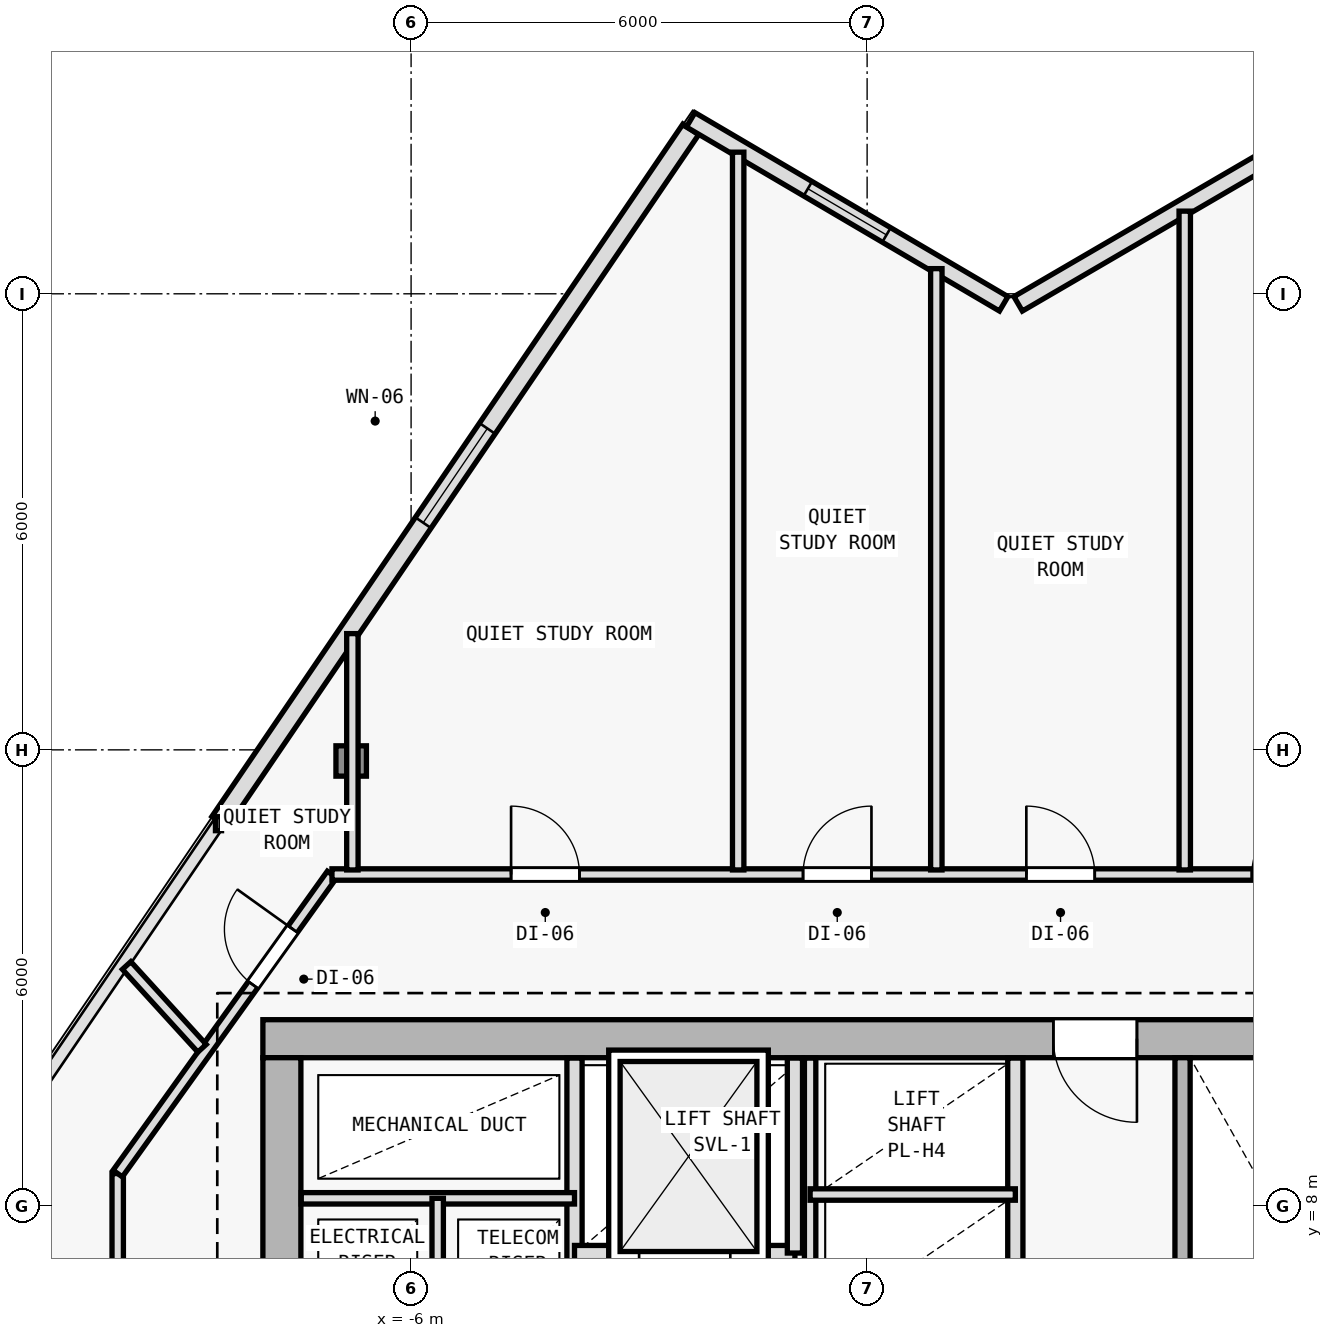
"""IFC4 building model, lengths in metres.
Left out: names, types, materials, properties, quantities, classifications, styles, units other than length and angle.
Written with IfcOpenShell. Run it as: python <this file> out.ifc"""

import sys

from ifc_helpers import new_model, si_unit, direction, frame, frame_2d, origin, origin_2d, place, context, subcontext, project, spatial, rectangle, i_section, extrude, element, fill, save


model = new_model("IFC4")
c1 = context("Model", 3, precision=1e-05, world=origin(), true_north=direction((0.0, 1.0)))
c2 = subcontext(c1, "Body", "Model", "MODEL_VIEW")
j1 = project(units=[si_unit("LENGTHUNIT", "METRE"), si_unit("PLANEANGLEUNIT", "RADIAN")], contexts=[c1])
p1 = place(None, origin())
s1 = spatial("IfcSite", under=j1, at=p1, CompositionType="ELEMENT")
p2 = place(p1, origin())
s2 = spatial("IfcBuilding", under=s1, at=p2, CompositionType="ELEMENT")
p3 = place(p2, frame((0.0, 0.0, 167.4)))
s3 = spatial("IfcBuildingStorey", under=s2, at=p3, CompositionType="ELEMENT", Elevation=167.4)
p4 = place(p3, frame((-7.7, 10.2, 0.0), z_axis=(0.0, 0.0, 1.0), x_axis=(1.0, 0.0, 0.0)))
e1 = element("IfcColumn", 1, at=p4, inside=s3, PredefinedType="COLUMN", context=c2, shape_type="SweptSolid", body=[
    extrude(i_section(OverallWidth=0.404, OverallDepth=0.407, WebThickness=0.017, FlangeThickness=0.028, FilletRadius=0.015, at=origin_2d()), origin(), (0.0, 0.0, 1.0), 3.6),
])
p5 = place(p3, frame((-6.788, 13.854, 0.006), z_axis=(0.008775143007, -0.002584925847, 0.999958156636), x_axis=(0.282568886397, 0.959247009086, 0.0)))
e2 = element("IfcColumn", 2, at=p5, inside=s3, PredefinedType="COLUMN", context=c2, shape_type="SweptSolid", body=[
    extrude(i_section(OverallWidth=0.401, OverallDepth=0.399, WebThickness=0.016, FlangeThickness=0.025, FilletRadius=0.015, at=origin_2d()), origin(), (0.0, 0.0, 1.0), 3.589),
])
p6 = place(p3, frame((-8.517, 13.053, 0.0), z_axis=(0.0, 0.0, 1.0), x_axis=(0.562463961516, 0.826821801838, 0.0)))
e3 = element("IfcWall", 3, at=p6, inside=s3, PredefinedType="SOLIDWALL", context=c2, shape_type="SweptSolid", body=[
    extrude(rectangle(XDim=11.018, YDim=0.25, at=frame_2d((5.509, 0.0))), origin(), (0.0, 0.0, 1.0), 3.35),
])
p7 = place(p6, frame((4.759, 0.0, 0.62)))
e4 = element("IfcOpeningElement", 4, at=p7, cuts=e3, PredefinedType="OPENING", context=c2, shape_type="SweptSolid", body=[
    extrude(rectangle(XDim=1.5, YDim=2.0, at=frame_2d((0.75, 1.0))), frame((0.0, 0.135, 0.0), z_axis=(0.0, -1.0, 0.0), x_axis=(1.0, 0.0, 0.0)), (0.0, 0.0, 1.0), 0.27),
])
p8 = place(p3, frame((1.987, 19.868, 0.0), z_axis=(0.0, 0.0, 1.0), x_axis=(0.863979520686, 0.503526948469, 0.0)))
e5 = element("IfcWall", 5, at=p8, inside=s3, PredefinedType="SOLIDWALL", context=c2, shape_type="SweptSolid", body=[
    extrude(rectangle(XDim=4.324, YDim=0.22, at=frame_2d((2.162, 0.0))), origin(), (0.0, 0.0, 1.0), 3.35),
])
p9 = place(p3, frame((-2.322, 22.289, 0.0), z_axis=(0.0, 0.0, 1.0), x_axis=(0.862111523483, -0.506718581738, 0.0)))
e6 = element("IfcWall", 6, at=p9, inside=s3, PredefinedType="SOLIDWALL", context=c2, shape_type="SweptSolid", body=[
    extrude(rectangle(XDim=4.777, YDim=0.22, at=frame_2d((2.389, 0.0))), origin(), (0.0, 0.0, 1.0), 3.35),
])
p10 = place(p9, frame((1.789, 0.0, 0.62)))
e7 = element("IfcOpeningElement", 7, at=p10, cuts=e6, PredefinedType="OPENING", context=c2, shape_type="SweptSolid", body=[
    extrude(rectangle(XDim=1.2, YDim=1.8, at=frame_2d((0.6, 0.9))), frame((0.0, 0.12, 0.0), z_axis=(0.0, -1.0, 0.0), x_axis=(1.0, 0.0, 0.0)), (0.0, 0.0, 1.0), 0.24),
])
p11 = place(p3, frame((7.95, 10.2, 0.0), z_axis=(0.0, 0.0, 1.0), x_axis=(-1.0, 0.0, 0.0)))
e8 = element("IfcWall", 8, at=p11, inside=s3, PredefinedType="SHEAR", context=c2, shape_type="SweptSolid", body=[
    extrude(rectangle(XDim=15.9, YDim=0.5, at=frame_2d((7.95, 0.0))), origin(), (0.0, 0.0, 1.0), 3.35),
])
p12 = place(p11, frame((4.4, 0.0, 0.0)))
e9 = element("IfcOpeningElement", 9, at=p12, cuts=e8, PredefinedType="OPENING", context=c2, shape_type="SweptSolid", body=[
    extrude(rectangle(XDim=1.1, YDim=2.15, at=frame_2d((0.55, 1.075))), frame((0.0, 0.26, 0.0), z_axis=(0.0, -1.0, 0.0), x_axis=(1.0, 0.0, 0.0)), (0.0, 0.0, 1.0), 0.52),
])
p13 = place(p3, frame((-7.7, -9.15, 0.0), z_axis=(0.0, 0.0, 1.0), x_axis=(0.0, 1.0, 0.0)))
e10 = element("IfcWall", 10, at=p13, inside=s3, PredefinedType="SHEAR", context=c2, shape_type="SweptSolid", body=[
    extrude(rectangle(XDim=19.1, YDim=0.5, at=frame_2d((9.55, 0.0))), origin(), (0.0, 0.0, 1.0), 3.35),
])
p14 = place(p13, frame((12.7, 0.0, 0.0)))
e11 = element("IfcOpeningElement", 11, at=p14, cuts=e10, PredefinedType="OPENING", context=c2, shape_type="SweptSolid", body=[
    extrude(rectangle(XDim=1.1, YDim=2.15, at=frame_2d((0.55, 1.075))), frame((0.0, 0.26, 0.0), z_axis=(0.0, -1.0, 0.0), x_axis=(1.0, 0.0, 0.0)), (0.0, 0.0, 1.0), 0.52),
])
p15 = place(p3, frame((-3.85, 1.35, 0.0), z_axis=(0.0, 0.0, 1.0), x_axis=(0.0, 1.0, 0.0)))
e12 = element("IfcWall", 12, at=p15, inside=s3, PredefinedType="SOLIDWALL", context=c2, shape_type="SweptSolid", body=[
    extrude(rectangle(XDim=8.595, YDim=0.2, at=frame_2d((4.297, 0.0))), origin(), (0.0, 0.0, 1.0), 3.35),
])
p16 = place(p15, frame((1.5, 0.0, 0.0)))
e13 = element("IfcOpeningElement", 13, at=p16, cuts=e12, PredefinedType="OPENING", context=c2, shape_type="SweptSolid", body=[
    extrude(rectangle(XDim=1.0, YDim=2.15, at=frame_2d((0.5, 1.075))), frame((0.0, 0.11, 0.0), z_axis=(0.0, -1.0, 0.0), x_axis=(1.0, 0.0, 0.0)), (0.0, 0.0, 1.0), 0.22),
])
p17 = place(p15, frame((3.18, 0.0, 0.0)))
e14 = element("IfcOpeningElement", 14, at=p17, cuts=e12, PredefinedType="OPENING", context=c2, shape_type="SweptSolid", body=[
    extrude(rectangle(XDim=1.0, YDim=2.15, at=frame_2d((0.5, 1.075))), frame((0.0, 0.11, 0.0), z_axis=(0.0, -1.0, 0.0), x_axis=(1.0, 0.0, 0.0)), (0.0, 0.0, 1.0), 0.22),
])
p18 = place(p3, frame((-7.445, 8.1, 0.0), z_axis=(0.0, 0.0, 1.0), x_axis=(1.0, 0.0, 0.0)))
e15 = element("IfcWall", 15, at=p18, inside=s3, PredefinedType="PARTITIONING", context=c2, shape_type="SweptSolid", body=[
    extrude(rectangle(XDim=3.595, YDim=0.15, at=frame_2d((1.797, 0.0))), origin(), (0.0, 0.0, 1.0), 3.35),
])
p19 = place(p3, frame((-5.65, 6.05, 0.0), z_axis=(0.0, 0.0, 1.0), x_axis=(0.0, 1.0, 0.0)))
e16 = element("IfcWall", 16, at=p19, inside=s3, PredefinedType="PARTITIONING", context=c2, shape_type="SweptSolid", body=[
    extrude(rectangle(XDim=2.05, YDim=0.15, at=frame_2d((1.025, 0.0))), origin(), (0.0, 0.0, 1.0), 3.35),
])
p20 = place(p3, frame((4.15, 2.75, 0.0), z_axis=(0.0, 0.0, 1.0), x_axis=(0.0, 1.0, 0.0)))
e17 = element("IfcWall", 17, at=p20, inside=s3, PredefinedType="SOLIDWALL", context=c2, shape_type="SweptSolid", body=[
    extrude(rectangle(XDim=7.2, YDim=0.2, at=frame_2d((3.6, 0.0))), origin(), (0.0, 0.0, 1.0), 3.35),
])
p21 = place(p20, frame((0.35, 0.0, 0.0)))
e18 = element("IfcOpeningElement", 18, at=p21, cuts=e17, PredefinedType="OPENING", context=c2, shape_type="SweptSolid", body=[
    extrude(rectangle(XDim=1.0, YDim=2.15, at=frame_2d((0.5, 1.075))), frame((0.0, 0.11, 0.0), z_axis=(0.0, -1.0, 0.0), x_axis=(1.0, 0.0, 0.0)), (0.0, 0.0, 1.0), 0.22),
])
p22 = place(p3, frame((-3.85, 7.38, 0.0), z_axis=(0.0, 0.0, 1.0), x_axis=(1.0, 0.0, 0.0)))
e19 = element("IfcWall", 19, at=p22, inside=s3, PredefinedType="SOLIDWALL", context=c2, shape_type="SweptSolid", body=[
    extrude(rectangle(XDim=2.9, YDim=0.2, at=frame_2d((1.45, 0.0))), origin(), (0.0, 0.0, 1.0), 3.35),
])
p23 = place(p22, frame((0.85, 0.0, 0.0)))
e20 = element("IfcOpeningElement", 20, at=p23, cuts=e19, PredefinedType="OPENING", context=c2, shape_type="SweptSolid", body=[
    extrude(rectangle(XDim=1.2, YDim=2.2, at=frame_2d((0.6, 1.1))), frame((0.0, 0.11, 0.0), z_axis=(0.0, -1.0, 0.0), x_axis=(1.0, 0.0, 0.0)), (0.0, 0.0, 1.0), 0.22),
])
p24 = place(p3, frame((-0.95, 7.38, 0.0), z_axis=(0.0, 0.0, 1.0), x_axis=(0.0, 1.0, 0.0)))
e21 = element("IfcWall", 21, at=p24, inside=s3, PredefinedType="SOLIDWALL", context=c2, shape_type="SweptSolid", body=[
    extrude(rectangle(XDim=2.565, YDim=0.2, at=frame_2d((1.283, 0.0))), origin(), (0.0, 0.0, 1.0), 3.35),
])
p25 = place(p3, frame((1.95, 2.65, 0.0), z_axis=(0.0, 0.0, 1.0), x_axis=(0.0, 1.0, 0.0)))
e22 = element("IfcWall", 22, at=p25, inside=s3, PredefinedType="SOLIDWALL", context=c2, shape_type="SweptSolid", body=[
    extrude(rectangle(XDim=7.295, YDim=0.2, at=frame_2d((3.647, 0.0))), origin(), (0.0, 0.0, 1.0), 3.35),
])
p26 = place(p3, frame((-0.75, 5.92, 0.0), z_axis=(0.0, 0.0, 1.0), x_axis=(0.0, 1.0, 0.0)))
e23 = element("IfcWall", 23, at=p26, inside=s3, PredefinedType="PARTITIONING", context=c2, shape_type="SweptSolid", body=[
    extrude(rectangle(XDim=4.025, YDim=0.15, at=frame_2d((2.013, 0.0))), origin(), (0.0, 0.0, 1.0), 3.35),
])
p27 = place(p3, frame((-0.75, 8.15, 0.0), z_axis=(0.0, 0.0, 1.0), x_axis=(1.0, 0.0, 0.0)))
e24 = element("IfcWall", 24, at=p27, inside=s3, PredefinedType="PARTITIONING", context=c2, shape_type="SweptSolid", body=[
    extrude(rectangle(XDim=2.7, YDim=0.15, at=frame_2d((1.35, 0.0))), origin(), (0.0, 0.0, 1.0), 3.35),
])
p28 = place(p3, frame((-9.86, -11.56, 0.0), z_axis=(0.0, 0.0, 1.0), x_axis=(0.0, 1.0, 0.0)))
e25 = element("IfcWall", 25, at=p28, inside=s3, PredefinedType="PARTITIONING", context=c2, shape_type="SweptSolid", body=[
    extrude(rectangle(XDim=19.986, YDim=0.15, at=frame_2d((9.993, 0.0))), origin(), (0.0, 0.0, 1.0), 2.775),
])
p29 = place(p28, frame((8.395, 0.0, 0.0)))
e26 = element("IfcOpeningElement", 26, at=p29, cuts=e25, PredefinedType="OPENING", context=c2, shape_type="SweptSolid", body=[
    extrude(rectangle(XDim=0.9, YDim=2.1, at=frame_2d((0.45, 1.05))), frame((0.0, 0.085, 0.0), z_axis=(0.0, -1.0, 0.0), x_axis=(1.0, 0.0, 0.0)), (0.0, 0.0, 1.0), 0.17),
])
p30 = place(p28, frame((5.685, 0.0, 0.0)))
e27 = element("IfcOpeningElement", 27, at=p30, cuts=e25, PredefinedType="OPENING", context=c2, shape_type="SweptSolid", body=[
    extrude(rectangle(XDim=0.9, YDim=2.1, at=frame_2d((0.45, 1.05))), frame((0.0, 0.085, 0.0), z_axis=(0.0, -1.0, 0.0), x_axis=(1.0, 0.0, 0.0)), (0.0, 0.0, 1.0), 0.17),
])
p31 = place(p28, frame((1.97, 0.0, 0.0)))
e28 = element("IfcOpeningElement", 28, at=p31, cuts=e25, PredefinedType="OPENING", context=c2, shape_type="SweptSolid", body=[
    extrude(rectangle(XDim=0.9, YDim=2.1, at=frame_2d((0.45, 1.05))), frame((0.0, 0.085, 0.0), z_axis=(0.0, -1.0, 0.0), x_axis=(1.0, 0.0, 0.0)), (0.0, 0.0, 1.0), 0.17),
])
p32 = place(p28, frame((16.972, 0.0, 0.0)))
e29 = element("IfcOpeningElement", 29, at=p32, cuts=e25, PredefinedType="OPENING", context=c2, shape_type="SweptSolid", body=[
    extrude(rectangle(XDim=0.9, YDim=2.1, at=frame_2d((0.45, 1.05))), frame((0.0, 0.085, 0.0), z_axis=(0.0, -1.0, 0.0), x_axis=(1.0, 0.0, 0.0)), (0.0, 0.0, 1.0), 0.17),
])
p33 = place(p28, frame((12.11, 0.0, 0.0)))
e30 = element("IfcOpeningElement", 30, at=p33, cuts=e25, PredefinedType="OPENING", context=c2, shape_type="SweptSolid", body=[
    extrude(rectangle(XDim=0.9, YDim=2.1, at=frame_2d((0.45, 1.05))), frame((0.0, 0.085, 0.0), z_axis=(0.0, -1.0, 0.0), x_axis=(1.0, 0.0, 0.0)), (0.0, 0.0, 1.0), 0.17),
])
p34 = place(p3, frame((-9.86, 8.426, 0.0), z_axis=(0.0, 0.0, 1.0), x_axis=(0.582449511476, 0.812866881218, 0.0)))
e31 = element("IfcWall", 31, at=p34, inside=s3, PredefinedType="PARTITIONING", context=c2, shape_type="SweptSolid", body=[
    extrude(rectangle(XDim=4.84, YDim=0.15, at=frame_2d((2.42, 0.0))), origin(), (0.0, 0.0, 1.0), 2.965),
])
p35 = place(p34, frame((3.055, 0.0, 0.0)))
e32 = element("IfcOpeningElement", 32, at=p35, cuts=e31, PredefinedType="OPENING", context=c2, shape_type="SweptSolid", body=[
    extrude(rectangle(XDim=0.9, YDim=2.1, at=frame_2d((0.45, 1.05))), frame((0.0, 0.085, 0.0), z_axis=(0.0, -1.0, 0.0), x_axis=(1.0, 0.0, 0.0)), (0.0, 0.0, 1.0), 0.17),
])
p36 = place(p3, frame((-7.041, 12.36, 0.0), z_axis=(0.0, 0.0, 1.0), x_axis=(1.0, 0.0, 0.0)))
e33 = element("IfcWall", 33, at=p36, inside=s3, PredefinedType="PARTITIONING", context=c2, shape_type="SweptSolid", body=[
    extrude(rectangle(XDim=14.064, YDim=0.15, at=frame_2d((7.032, 0.0))), origin(), (0.0, 0.0, 1.0), 2.965),
])
p37 = place(p36, frame((12.103, 0.0, 0.0)))
e34 = element("IfcOpeningElement", 34, at=p37, cuts=e33, PredefinedType="OPENING", context=c2, shape_type="SweptSolid", body=[
    extrude(rectangle(XDim=0.9, YDim=2.1, at=frame_2d((0.45, 1.05))), frame((0.0, 0.085, 0.0), z_axis=(0.0, -1.0, 0.0), x_axis=(1.0, 0.0, 0.0)), (0.0, 0.0, 1.0), 0.17),
])
p38 = place(p36, frame((9.136, 0.0, 0.0)))
e35 = element("IfcOpeningElement", 35, at=p38, cuts=e33, PredefinedType="OPENING", context=c2, shape_type="SweptSolid", body=[
    extrude(rectangle(XDim=0.9, YDim=2.1, at=frame_2d((0.45, 1.05))), frame((0.0, 0.085, 0.0), z_axis=(0.0, -1.0, 0.0), x_axis=(1.0, 0.0, 0.0)), (0.0, 0.0, 1.0), 0.17),
])
p39 = place(p36, frame((6.198, 0.0, 0.0)))
e36 = element("IfcOpeningElement", 36, at=p39, cuts=e33, PredefinedType="OPENING", context=c2, shape_type="SweptSolid", body=[
    extrude(rectangle(XDim=0.9, YDim=2.1, at=frame_2d((0.45, 1.05))), frame((0.0, 0.085, 0.0), z_axis=(0.0, -1.0, 0.0), x_axis=(1.0, 0.0, 0.0)), (0.0, 0.0, 1.0), 0.17),
])
p40 = place(p36, frame((2.357, 0.0, 0.0)))
e37 = element("IfcOpeningElement", 37, at=p40, cuts=e33, PredefinedType="OPENING", context=c2, shape_type="SweptSolid", body=[
    extrude(rectangle(XDim=0.9, YDim=2.1, at=frame_2d((0.45, 1.05))), frame((0.0, 0.085, 0.0), z_axis=(0.0, -1.0, 0.0), x_axis=(1.0, 0.0, 0.0)), (0.0, 0.0, 1.0), 0.17),
])
p41 = place(p3, frame((-6.772, 12.42, 0.0), z_axis=(0.0, 0.0, 1.0), x_axis=(0.0, 1.0, 0.0)))
e38 = element("IfcWall", 38, at=p41, inside=s3, PredefinedType="PARTITIONING", context=c2, shape_type="SweptSolid", body=[
    extrude(rectangle(XDim=3.109, YDim=0.15, at=frame_2d((1.555, 0.0))), origin(), (0.0, 0.0, 1.0), 2.935),
])
p42 = place(p3, frame((0.91, 12.42, 0.0), z_axis=(0.0, 0.0, 1.0), x_axis=(0.0, 1.0, 0.0)))
e39 = element("IfcWall", 39, at=p42, inside=s3, PredefinedType="PARTITIONING", context=c2, shape_type="SweptSolid", body=[
    extrude(rectangle(XDim=7.911, YDim=0.15, at=frame_2d((3.956, 0.0))), origin(), (0.0, 0.0, 1.0), 2.935),
])
p43 = place(p3, frame((-8.75, 10.074, 0.0), z_axis=(0.0, 0.0, 1.0), x_axis=(-0.673703282985, 0.739001952971, 0.0)))
e40 = element("IfcWall", 40, at=p43, inside=s3, PredefinedType="PARTITIONING", context=c2, shape_type="SweptSolid", body=[
    extrude(rectangle(XDim=1.473, YDim=0.15, at=frame_2d((0.737, 0.0))), origin(), (0.0, 0.0, 1.0), 2.935),
])
p44 = place(p3, frame((4.179, 12.42, 0.0), z_axis=(0.0, 0.0, 1.0), x_axis=(0.0, 1.0, 0.0)))
e41 = element("IfcWall", 41, at=p44, inside=s3, PredefinedType="PARTITIONING", context=c2, shape_type="SweptSolid", body=[
    extrude(rectangle(XDim=8.667, YDim=0.15, at=frame_2d((4.334, 0.0))), origin(), (0.0, 0.0, 1.0), 2.935),
])
p45 = place(p3, frame((-1.697, 12.42, 0.0), z_axis=(0.0, 0.0, 1.0), x_axis=(0.0, 1.0, 0.0)))
e42 = element("IfcWall", 42, at=p45, inside=s3, PredefinedType="PARTITIONING", context=c2, shape_type="SweptSolid", body=[
    extrude(rectangle(XDim=9.443, YDim=0.15, at=frame_2d((4.722, 0.0))), origin(), (0.0, 0.0, 1.0), 2.935),
])
p46 = place(p7, origin())
e43 = element("IfcWindow", 43, at=p46, inside=s3, PartitioningType="SINGLE_PANEL", PredefinedType="WINDOW", context=c2, shape_type="SweptSolid", body=[
    extrude(rectangle(XDim=1.5, YDim=2.0, at=frame_2d((0.75, 1.0))), frame((0.0, 0.03, 0.0), z_axis=(0.0, -1.0, 0.0), x_axis=(1.0, 0.0, 0.0)), (0.0, 0.0, 1.0), 0.06),
])
fill(e4, e43)
p47 = place(p10, origin())
e44 = element("IfcWindow", 44, at=p47, inside=s3, PartitioningType="SINGLE_PANEL", PredefinedType="WINDOW", context=c2, shape_type="SweptSolid", body=[
    extrude(rectangle(XDim=1.2, YDim=1.8, at=frame_2d((0.6, 0.9))), frame((0.0, 0.03, 0.0), z_axis=(0.0, -1.0, 0.0), x_axis=(1.0, 0.0, 0.0)), (0.0, 0.0, 1.0), 0.06),
])
fill(e7, e44)
p48 = place(p12, origin())
e45 = element("IfcDoor", 45, at=p48, inside=s3, OperationType="SINGLE_SWING_LEFT", PredefinedType="DOOR", context=c2, shape_type="SweptSolid", body=[
    extrude(rectangle(XDim=1.1, YDim=2.15, at=frame_2d((0.55, 1.075))), frame((0.0, 0.025, 0.0), z_axis=(0.0, -1.0, 0.0), x_axis=(1.0, 0.0, 0.0)), (0.0, 0.0, 1.0), 0.05),
])
fill(e9, e45)
p49 = place(p23, origin())
e46 = element("IfcDoor", 46, at=p49, inside=s3, OperationType="DOUBLE_DOOR_SLIDING", PredefinedType="DOOR", context=c2, shape_type="SweptSolid", body=[
    extrude(rectangle(XDim=1.2, YDim=2.2, at=frame_2d((0.6, 1.1))), frame((0.0, 0.025, 0.0), z_axis=(0.0, -1.0, 0.0), x_axis=(1.0, 0.0, 0.0)), (0.0, 0.0, 1.0), 0.05),
])
fill(e20, e46)
p50 = place(p37, origin())
e47 = element("IfcDoor", 47, at=p50, inside=s3, OperationType="SINGLE_SWING_RIGHT", PredefinedType="DOOR", context=c2, shape_type="SweptSolid", body=[
    extrude(rectangle(XDim=0.9, YDim=2.1, at=frame_2d((0.45, 1.05))), frame((0.0, 0.025, 0.0), z_axis=(0.0, -1.0, 0.0), x_axis=(1.0, 0.0, 0.0)), (0.0, 0.0, 1.0), 0.05),
])
fill(e34, e47)
p51 = place(p38, origin())
e48 = element("IfcDoor", 48, at=p51, inside=s3, OperationType="SINGLE_SWING_LEFT", PredefinedType="DOOR", context=c2, shape_type="SweptSolid", body=[
    extrude(rectangle(XDim=0.9, YDim=2.1, at=frame_2d((0.45, 1.05))), frame((0.0, 0.025, 0.0), z_axis=(0.0, -1.0, 0.0), x_axis=(1.0, 0.0, 0.0)), (0.0, 0.0, 1.0), 0.05),
])
fill(e35, e48)
p52 = place(p39, origin())
e49 = element("IfcDoor", 49, at=p52, inside=s3, OperationType="SINGLE_SWING_RIGHT", PredefinedType="DOOR", context=c2, shape_type="SweptSolid", body=[
    extrude(rectangle(XDim=0.9, YDim=2.1, at=frame_2d((0.45, 1.05))), frame((0.0, 0.025, 0.0), z_axis=(0.0, -1.0, 0.0), x_axis=(1.0, 0.0, 0.0)), (0.0, 0.0, 1.0), 0.05),
])
fill(e36, e49)
p53 = place(p40, origin())
e50 = element("IfcDoor", 50, at=p53, inside=s3, OperationType="SINGLE_SWING_LEFT", PredefinedType="DOOR", context=c2, shape_type="SweptSolid", body=[
    extrude(rectangle(XDim=0.9, YDim=2.1, at=frame_2d((0.45, 1.05))), frame((0.0, 0.025, 0.0), z_axis=(0.0, -1.0, 0.0), x_axis=(1.0, 0.0, 0.0)), (0.0, 0.0, 1.0), 0.05),
])
fill(e37, e50)
p54 = place(p35, origin())
e51 = element("IfcDoor", 51, at=p54, inside=s3, OperationType="SINGLE_SWING_RIGHT", PredefinedType="DOOR", context=c2, shape_type="SweptSolid", body=[
    extrude(rectangle(XDim=0.9, YDim=2.1, at=frame_2d((0.45, 1.05))), frame((0.0, 0.025, 0.0), z_axis=(0.0, -1.0, 0.0), x_axis=(1.0, 0.0, 0.0)), (0.0, 0.0, 1.0), 0.05),
])
fill(e32, e51)
save(model, sys.argv[1])
